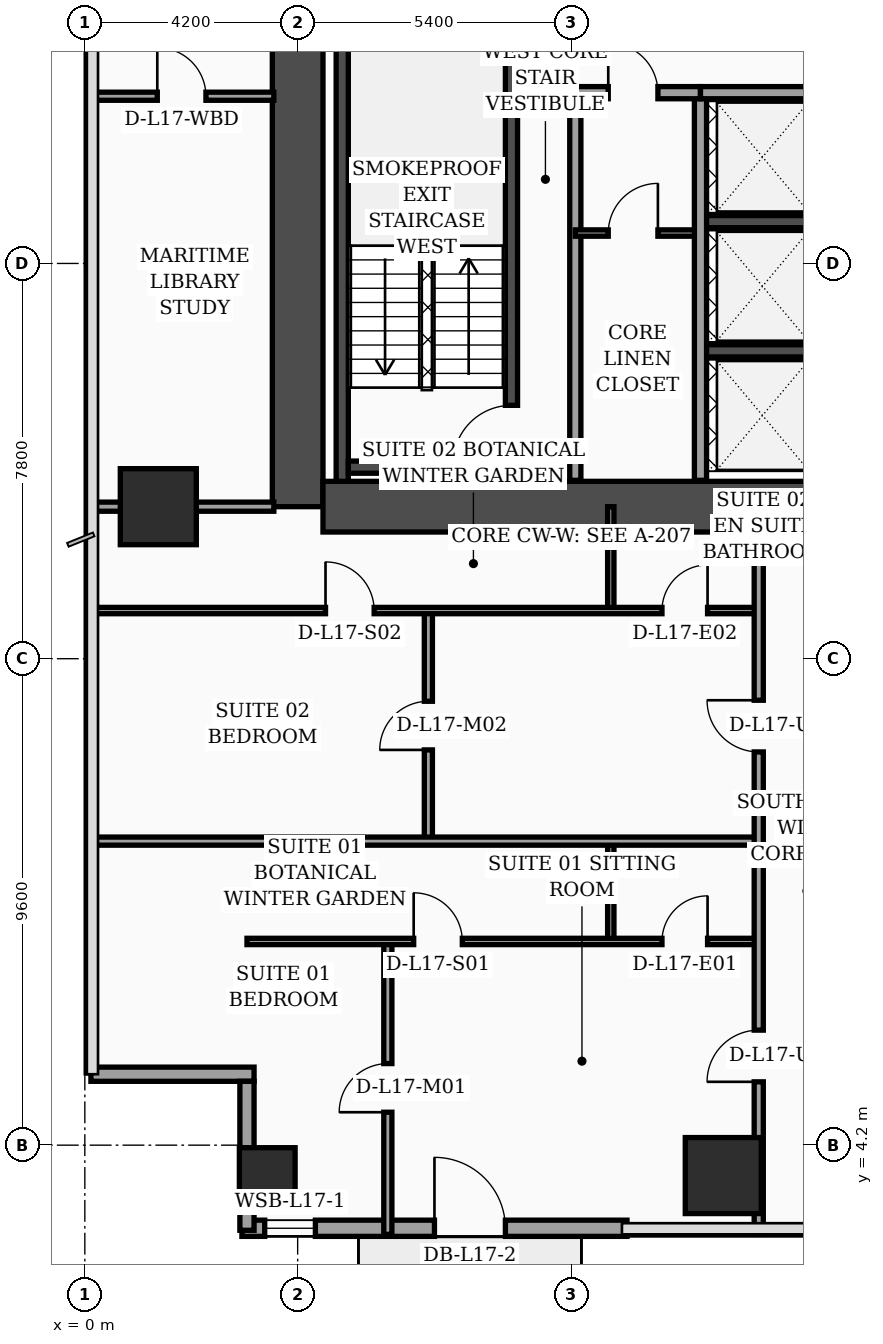
"""IFC4 building model, lengths in metres.
Left out: names, types, materials, properties, quantities, classifications, styles, units other than length and angle.
Written with IfcOpenShell. Run it as: python <this file> out.ifc"""

import sys

from ifc_helpers import new_model, si_unit, direction, frame, frame_2d, origin, origin_2d, place, context, subcontext, project, spatial, rectangle, hollow_rectangle, extrude, element, fill, save


model = new_model("IFC4")
c1 = context("Model", 3, precision=1e-05, world=origin(), true_north=direction((0.0, 1.0)))
c2 = subcontext(c1, "Body", "Model", "MODEL_VIEW")
j1 = project(units=[si_unit("LENGTHUNIT", "METRE"), si_unit("PLANEANGLEUNIT", "RADIAN")], contexts=[c1])
p1 = place(None, origin())
s1 = spatial("IfcSite", under=j1, at=p1, CompositionType="ELEMENT")
p2 = place(p1, origin())
s2 = spatial("IfcBuilding", under=s1, at=p2, CompositionType="ELEMENT")
p3 = place(p2, frame((0.0, 0.0, 73.6)))
s3 = spatial("IfcBuildingStorey", under=s2, at=p3, CompositionType="ELEMENT", Elevation=73.6)
p4 = place(p3, frame((4.2, 16.8, 0.0), z_axis=(0.0, 0.0, 1.0), x_axis=(0.0, 1.0, 0.0)))
e1 = element("IfcWall", 1, at=p4, inside=s3, PredefinedType="SHEAR", context=c2, shape_type="SweptSolid", body=[
    extrude(rectangle(XDim=21.6, YDim=1.0, at=frame_2d((10.8, 0.0))), origin(), (0.0, 0.0, 1.0), 3.56),
])
p5 = place(p3, frame((4.7, 16.8, 0.0), z_axis=(0.0, 0.0, 1.0), x_axis=(1.0, 0.0, 0.0)))
e2 = element("IfcWall", 2, at=p5, inside=s3, PredefinedType="SHEAR", context=c2, shape_type="SweptSolid", body=[
    extrude(rectangle(XDim=9.8, YDim=1.0, at=frame_2d((4.9, 0.0))), origin(), (0.0, 0.0, 1.0), 3.56),
])
p6 = place(p3, frame((5.08, 17.3, 0.0), z_axis=(0.0, 0.0, 1.0), x_axis=(0.0, 1.0, 0.0)))
e3 = element("IfcWall", 3, at=p6, inside=s3, PredefinedType="SOLIDWALL", context=c2, shape_type="SweptSolid", body=[
    extrude(rectangle(XDim=9.49, YDim=0.24, at=frame_2d((4.745, 0.0))), origin(), (0.0, 0.0, 1.0), 3.56),
])
p7 = place(p3, frame((8.42, 17.3, 0.0), z_axis=(0.0, 0.0, 1.0), x_axis=(0.0, 1.0, 0.0)))
e4 = element("IfcWall", 4, at=p7, inside=s3, PredefinedType="SOLIDWALL", context=c2, shape_type="SweptSolid", body=[
    extrude(rectangle(XDim=9.49, YDim=0.24, at=frame_2d((4.745, 0.0))), origin(), (0.0, 0.0, 1.0), 3.56),
])
p8 = place(p7, frame((0.35, 0.0, 0.0)))
e5 = element("IfcOpeningElement", 5, at=p8, cuts=e4, PredefinedType="OPENING", context=c2, shape_type="SweptSolid", body=[
    extrude(rectangle(XDim=1.15, YDim=2.2, at=frame_2d((0.575, 1.1))), frame((0.0, 0.13, 0.0), z_axis=(0.0, -1.0, 0.0), x_axis=(1.0, 0.0, 0.0)), (0.0, 0.0, 1.0), 0.26),
])
p9 = place(p3, frame((5.2, 17.58, 0.0), z_axis=(0.0, 0.0, 1.0), x_axis=(1.0, 0.0, 0.0)))
e6 = element("IfcWall", 6, at=p9, inside=s3, PredefinedType="SOLIDWALL", context=c2, shape_type="SweptSolid", body=[
    extrude(rectangle(XDim=3.1, YDim=0.24, at=frame_2d((1.55, 0.0))), origin(), (0.0, 0.0, 1.0), 3.56),
])
for number, where, z_axis, x_axis in (
    (7, (12.18, 19.875, 0.0), (0.0, 0.0, 1.0), (1.0, 0.0, 0.0)),
    (8, (12.18, 22.425, 0.0), (0.0, 0.0, 1.0), (1.0, 0.0, 0.0)),
):
    element("IfcWall", number, at=place(p3, frame(where, z_axis=z_axis, x_axis=x_axis)), inside=s3, PredefinedType="SOLIDWALL", context=c2, shape_type="SweptSolid", body=[
        extrude(rectangle(XDim=2.32, YDim=0.24, at=frame_2d((1.16, 0.0))), origin(), (0.0, 0.0, 1.0), 3.56),
    ])
p10 = place(p3, frame((3.6, 3.6, 0.0), z_axis=(0.0, 0.0, 1.0), x_axis=(1.0, 0.0, 0.0)))
e9 = element("IfcColumn", 9, at=p10, inside=s3, PredefinedType="COLUMN", context=c2, shape_type="SweptSolid", body=[
    extrude(hollow_rectangle(XDim=1.1, YDim=1.1, WallThickness=0.045, at=origin_2d()), origin(), (0.0, 0.0, 1.0), 3.56),
])
for number, where, z_axis, x_axis in (
    (10, (1.45, 16.8, 0.0), (0.0, 0.0, 1.0), (1.0, 0.0, 0.0)),
    (11, (12.6, 3.6, 0.0), (0.0, 0.0, 1.0), (1.0, 0.0, 0.0)),
):
    element("IfcColumn", number, at=place(p3, frame(where, z_axis=z_axis, x_axis=x_axis)), inside=s3, PredefinedType="COLUMN", context=c2, shape_type="SweptSolid", body=[
        extrude(rectangle(XDim=1.5, YDim=1.5, at=origin_2d()), origin(), (0.0, 0.0, 1.0), 3.56),
    ])
p11 = place(p3, frame((3.1, 2.56, 0.0), z_axis=(0.0, 0.0, 1.0), x_axis=(1.0, 0.0, 0.0)))
e12 = element("IfcWall", 12, at=p11, inside=s3, PredefinedType="SOLIDWALL", context=c2, shape_type="SweptSolid", body=[
    extrude(rectangle(XDim=7.6, YDim=0.32, at=frame_2d((3.8, 0.0))), origin(), (0.0, 0.0, 1.0), 3.56),
])
p12 = place(p11, frame((0.45, 0.0, 0.75)))
e13 = element("IfcOpeningElement", 13, at=p12, cuts=e12, PredefinedType="OPENING", context=c2, shape_type="SweptSolid", body=[
    extrude(rectangle(XDim=1.0, YDim=1.6, at=frame_2d((0.5, 0.8))), frame((0.0, 0.17, 0.0), z_axis=(0.0, -1.0, 0.0), x_axis=(1.0, 0.0, 0.0)), (0.0, 0.0, 1.0), 0.34),
])
p13 = place(p11, frame((3.8, 0.0, 0.0)))
e14 = element("IfcOpeningElement", 14, at=p13, cuts=e12, PredefinedType="OPENING", context=c2, shape_type="SweptSolid", body=[
    extrude(rectangle(XDim=1.4, YDim=2.25, at=frame_2d((0.7, 1.125))), frame((0.0, 0.17, 0.0), z_axis=(0.0, -1.0, 0.0), x_axis=(1.0, 0.0, 0.0)), (0.0, 0.0, 1.0), 0.34),
])
p14 = place(p3, frame((0.12, 5.6, 0.0), z_axis=(0.0, 0.0, 1.0), x_axis=(1.0, 0.0, 0.0)))
e15 = element("IfcWall", 15, at=p14, inside=s3, PredefinedType="SOLIDWALL", context=c2, shape_type="SweptSolid", body=[
    extrude(rectangle(XDim=3.22, YDim=0.28, at=frame_2d((1.61, 0.0))), origin(), (0.0, 0.0, 1.0), 2.84),
])
p15 = place(p3, frame((3.2, 5.46, 0.0), z_axis=(0.0, 0.0, 1.0), x_axis=(0.0, -1.0, 0.0)))
e16 = element("IfcWall", 16, at=p15, inside=s3, PredefinedType="SOLIDWALL", context=c2, shape_type="SweptSolid", body=[
    extrude(rectangle(XDim=2.94, YDim=0.28, at=frame_2d((1.47, 0.0))), origin(), (0.0, 0.0, 1.0), 2.84),
])
p16 = place(p3, frame((9.68, 17.32, 0.0), z_axis=(0.0, 0.0, 1.0), x_axis=(0.0, 1.0, 0.0)))
e17 = element("IfcWall", 17, at=p16, inside=s3, PredefinedType="SOLIDWALL", context=c2, shape_type="SweptSolid", body=[
    extrude(rectangle(XDim=7.68, YDim=0.22, at=frame_2d((3.84, 0.0))), origin(), (0.0, 0.0, 1.0), 3.56),
])
p17 = place(p3, frame((9.68, 22.2, 0.0), z_axis=(0.0, 0.0, 1.0), x_axis=(1.0, 0.0, 0.0)))
e18 = element("IfcWall", 18, at=p17, inside=s3, PredefinedType="PARTITIONING", context=c2, shape_type="SweptSolid", body=[
    extrude(rectangle(XDim=2.47, YDim=0.125, at=frame_2d((1.235, 0.0))), origin(), (0.0, 0.0, 1.0), 3.56),
])
p18 = place(p17, frame((0.65, 0.0, 0.0)))
e19 = element("IfcOpeningElement", 19, at=p18, cuts=e18, PredefinedType="OPENING", context=c2, shape_type="SweptSolid", body=[
    extrude(rectangle(XDim=0.98, YDim=2.15, at=frame_2d((0.49, 1.075))), frame((0.0, 0.073, 0.0), z_axis=(0.0, -1.0, 0.0), x_axis=(1.0, 0.0, 0.0)), (0.0, 0.0, 1.0), 0.145),
])
p19 = place(p3, frame((12.15, 17.32, 0.0), z_axis=(0.0, 0.0, 1.0), x_axis=(0.0, 1.0, 0.0)))
e20 = element("IfcWall", 20, at=p19, inside=s3, PredefinedType="SOLIDWALL", context=c2, shape_type="SweptSolid", body=[
    extrude(rectangle(XDim=7.65, YDim=0.24, at=frame_2d((3.825, 0.0))), origin(), (0.0, 0.0, 1.0), 3.56),
])
p20 = place(p3, frame((9.68, 24.97, 0.0), z_axis=(0.0, 0.0, 1.0), x_axis=(1.0, 0.0, 0.0)))
e21 = element("IfcWall", 21, at=p20, inside=s3, PredefinedType="SOLIDWALL", context=c2, shape_type="SweptSolid", body=[
    extrude(rectangle(XDim=2.47, YDim=0.24, at=frame_2d((1.235, 0.0))), origin(), (0.0, 0.0, 1.0), 3.56),
])
p21 = place(p20, frame((0.65, 0.0, 0.0)))
e22 = element("IfcOpeningElement", 22, at=p21, cuts=e21, PredefinedType="OPENING", context=c2, shape_type="SweptSolid", body=[
    extrude(rectangle(XDim=0.98, YDim=2.15, at=frame_2d((0.49, 1.075))), frame((0.0, 0.13, 0.0), z_axis=(0.0, -1.0, 0.0), x_axis=(1.0, 0.0, 0.0)), (0.0, 0.0, 1.0), 0.26),
])
p22 = place(p3, frame((12.15, 24.97, 0.0), z_axis=(0.0, 0.0, 1.0), x_axis=(1.0, 0.0, 0.0)))
e23 = element("IfcWall", 23, at=p22, inside=s3, PredefinedType="SOLIDWALL", context=c2, shape_type="SweptSolid", body=[
    extrude(rectangle(XDim=2.33, YDim=0.24, at=frame_2d((1.165, 0.0))), origin(), (0.0, 0.0, 1.0), 2.84),
])
p23 = place(p3, frame((0.08, 24.9, 0.0), z_axis=(0.0, 0.0, 1.0), x_axis=(1.0, 0.0, 0.0)))
e24 = element("IfcWall", 24, at=p23, inside=s3, PredefinedType="PARTITIONING", context=c2, shape_type="SweptSolid", body=[
    extrude(rectangle(XDim=3.65, YDim=0.16, at=frame_2d((1.825, 0.0))), origin(), (0.0, 0.0, 1.0), 3.04),
])
p24 = place(p23, frame((1.35, 0.0, 0.0)))
e25 = element("IfcOpeningElement", 25, at=p24, cuts=e24, PredefinedType="OPENING", context=c2, shape_type="SweptSolid", body=[
    extrude(rectangle(XDim=0.96, YDim=2.2, at=frame_2d((0.48, 1.1))), frame((0.0, 0.09, 0.0), z_axis=(0.0, -1.0, 0.0), x_axis=(1.0, 0.0, 0.0)), (0.0, 0.0, 1.0), 0.18),
])
p25 = place(p3, frame((0.08, 16.8, 0.0), z_axis=(0.0, 0.0, 1.0), x_axis=(1.0, 0.0, 0.0)))
e26 = element("IfcWall", 26, at=p25, inside=s3, PredefinedType="PARTITIONING", context=c2, shape_type="SweptSolid", body=[
    extrude(rectangle(XDim=3.65, YDim=0.18, at=frame_2d((1.825, 0.0))), origin(), (0.0, 0.0, 1.0), 2.84),
])
p26 = place(p3, frame((10.38, 8.22, 0.0), z_axis=(0.0, 0.0, 1.0), x_axis=(0.0, 1.0, 0.0)))
e27 = element("IfcWall", 27, at=p26, inside=s3, PredefinedType="PARTITIONING", context=c2, shape_type="SweptSolid", body=[
    extrude(rectangle(XDim=1.98, YDim=0.125, at=frame_2d((0.99, 0.0))), origin(), (0.0, 0.0, 1.0), 3.14),
])
p27 = place(p3, frame((5.98, 2.44, 0.0), z_axis=(0.0, 0.0, 1.0), x_axis=(0.0, 1.0, 0.0)))
e28 = element("IfcWall", 28, at=p27, inside=s3, PredefinedType="PARTITIONING", context=c2, shape_type="SweptSolid", body=[
    extrude(rectangle(XDim=5.78, YDim=0.16, at=frame_2d((2.89, 0.0))), origin(), (0.0, 0.0, 1.0), 3.04),
])
p28 = place(p27, frame((2.41, 0.0, 0.0)))
e29 = element("IfcOpeningElement", 29, at=p28, cuts=e28, PredefinedType="OPENING", context=c2, shape_type="SweptSolid", body=[
    extrude(rectangle(XDim=0.96, YDim=2.2, at=frame_2d((0.48, 1.1))), frame((0.0, 0.09, 0.0), z_axis=(0.0, -1.0, 0.0), x_axis=(1.0, 0.0, 0.0)), (0.0, 0.0, 1.0), 0.18),
])
p29 = place(p3, frame((3.2, 8.22, 0.0), z_axis=(0.0, 0.0, 1.0), x_axis=(1.0, 0.0, 0.0)))
e30 = element("IfcWall", 30, at=p29, inside=s3, PredefinedType="PARTITIONING", context=c2, shape_type="SweptSolid", body=[
    extrude(rectangle(XDim=10.1, YDim=0.125, at=frame_2d((5.05, 0.0))), origin(), (0.0, 0.0, 1.0), 2.84),
])
p30 = place(p29, frame((3.29, 0.0, 0.0)))
e31 = element("IfcOpeningElement", 31, at=p30, cuts=e30, PredefinedType="OPENING", context=c2, shape_type="SweptSolid", body=[
    extrude(rectangle(XDim=0.96, YDim=2.2, at=frame_2d((0.48, 1.1))), frame((0.0, 0.073, 0.0), z_axis=(0.0, -1.0, 0.0), x_axis=(1.0, 0.0, 0.0)), (0.0, 0.0, 1.0), 0.145),
])
p31 = place(p29, frame((8.19, 0.0, 0.0)))
e32 = element("IfcOpeningElement", 32, at=p31, cuts=e30, PredefinedType="OPENING", context=c2, shape_type="SweptSolid", body=[
    extrude(rectangle(XDim=0.9, YDim=2.15, at=frame_2d((0.45, 1.075))), frame((0.0, 0.073, 0.0), z_axis=(0.0, -1.0, 0.0), x_axis=(1.0, 0.0, 0.0)), (0.0, 0.0, 1.0), 0.145),
])
p32 = place(p3, frame((10.38, 14.75, 0.0), z_axis=(0.0, 0.0, 1.0), x_axis=(0.0, 1.0, 0.0)))
e33 = element("IfcWall", 33, at=p32, inside=s3, PredefinedType="PARTITIONING", context=c2, shape_type="SweptSolid", body=[
    extrude(rectangle(XDim=2.05, YDim=0.125, at=frame_2d((1.025, 0.0))), origin(), (0.0, 0.0, 1.0), 3.56),
])
p33 = place(p3, frame((6.78, 10.2, 0.0), z_axis=(0.0, 0.0, 1.0), x_axis=(0.0, 1.0, 0.0)))
e34 = element("IfcWall", 34, at=p33, inside=s3, PredefinedType="PARTITIONING", context=c2, shape_type="SweptSolid", body=[
    extrude(rectangle(XDim=4.55, YDim=0.16, at=frame_2d((2.275, 0.0))), origin(), (0.0, 0.0, 1.0), 3.14),
])
p34 = place(p33, frame((1.8, 0.0, 0.0)))
e35 = element("IfcOpeningElement", 35, at=p34, cuts=e34, PredefinedType="OPENING", context=c2, shape_type="SweptSolid", body=[
    extrude(rectangle(XDim=0.96, YDim=2.2, at=frame_2d((0.48, 1.1))), frame((0.0, 0.09, 0.0), z_axis=(0.0, -1.0, 0.0), x_axis=(1.0, 0.0, 0.0)), (0.0, 0.0, 1.0), 0.18),
])
p35 = place(p3, frame((0.08, 14.75, 0.0), z_axis=(0.0, 0.0, 1.0), x_axis=(1.0, 0.0, 0.0)))
e36 = element("IfcWall", 36, at=p35, inside=s3, PredefinedType="PARTITIONING", context=c2, shape_type="SweptSolid", body=[
    extrude(rectangle(XDim=13.22, YDim=0.125, at=frame_2d((6.61, 0.0))), origin(), (0.0, 0.0, 1.0), 2.84),
])
p36 = place(p35, frame((4.67, 0.0, 0.0)))
e37 = element("IfcOpeningElement", 37, at=p36, cuts=e36, PredefinedType="OPENING", context=c2, shape_type="SweptSolid", body=[
    extrude(rectangle(XDim=0.96, YDim=2.2, at=frame_2d((0.48, 1.1))), frame((0.0, 0.073, 0.0), z_axis=(0.0, -1.0, 0.0), x_axis=(1.0, 0.0, 0.0)), (0.0, 0.0, 1.0), 0.145),
])
p37 = place(p35, frame((11.31, 0.0, 0.0)))
e38 = element("IfcOpeningElement", 38, at=p37, cuts=e36, PredefinedType="OPENING", context=c2, shape_type="SweptSolid", body=[
    extrude(rectangle(XDim=0.9, YDim=2.15, at=frame_2d((0.45, 1.075))), frame((0.0, 0.073, 0.0), z_axis=(0.0, -1.0, 0.0), x_axis=(1.0, 0.0, 0.0)), (0.0, 0.0, 1.0), 0.145),
])
p38 = place(p3, frame((0.08, 10.2, 0.0), z_axis=(0.0, 0.0, 1.0), x_axis=(1.0, 0.0, 0.0)))
e39 = element("IfcWall", 39, at=p38, inside=s3, PredefinedType="PARTITIONING", context=c2, shape_type="SweptSolid", body=[
    extrude(rectangle(XDim=13.22, YDim=0.16, at=frame_2d((6.61, 0.0))), origin(), (0.0, 0.0, 1.0), 2.84),
])
p39 = place(p3, frame((13.3, 2.44, 0.0), z_axis=(0.0, 0.0, 1.0), x_axis=(0.0, 1.0, 0.0)))
e40 = element("IfcWall", 40, at=p39, inside=s3, PredefinedType="PARTITIONING", context=c2, shape_type="SweptSolid", body=[
    extrude(rectangle(XDim=14.36, YDim=0.18, at=frame_2d((7.18, 0.0))), origin(), (0.0, 0.0, 1.0), 3.04),
])
p40 = place(p39, frame((3.01, 0.0, 0.0)))
e41 = element("IfcOpeningElement", 41, at=p40, cuts=e40, PredefinedType="OPENING", context=c2, shape_type="SweptSolid", body=[
    extrude(rectangle(XDim=1.02, YDim=2.2, at=frame_2d((0.51, 1.1))), frame((0.0, 0.1, 0.0), z_axis=(0.0, -1.0, 0.0), x_axis=(1.0, 0.0, 0.0)), (0.0, 0.0, 1.0), 0.2),
])
p41 = place(p39, frame((9.52, 0.0, 0.0)))
e42 = element("IfcOpeningElement", 42, at=p41, cuts=e40, PredefinedType="OPENING", context=c2, shape_type="SweptSolid", body=[
    extrude(rectangle(XDim=1.02, YDim=2.2, at=frame_2d((0.51, 1.1))), frame((0.0, 0.1, 0.0), z_axis=(0.0, -1.0, 0.0), x_axis=(1.0, 0.0, 0.0)), (0.0, 0.0, 1.0), 0.2),
])
p42 = place(p12, origin())
e43 = element("IfcWindow", 43, at=p42, inside=s3, PartitioningType="SINGLE_PANEL", PredefinedType="WINDOW", context=c2, shape_type="SweptSolid", body=[
    extrude(rectangle(XDim=1.0, YDim=1.6, at=frame_2d((0.5, 0.8))), frame((0.0, 0.03, 0.0), z_axis=(0.0, -1.0, 0.0), x_axis=(1.0, 0.0, 0.0)), (0.0, 0.0, 1.0), 0.06),
])
fill(e13, e43)
p43 = place(p13, origin())
e44 = element("IfcDoor", 44, at=p43, inside=s3, OperationType="SINGLE_SWING_LEFT", PredefinedType="DOOR", context=c2, shape_type="SweptSolid", body=[
    extrude(rectangle(XDim=1.4, YDim=2.25, at=frame_2d((0.7, 1.125))), frame((0.0, 0.025, 0.0), z_axis=(0.0, -1.0, 0.0), x_axis=(1.0, 0.0, 0.0)), (0.0, 0.0, 1.0), 0.05),
])
fill(e14, e44)
p44 = place(p18, origin())
e45 = element("IfcDoor", 45, at=p44, inside=s3, OperationType="SINGLE_SWING_RIGHT", PredefinedType="DOOR", context=c2, shape_type="SweptSolid", body=[
    extrude(rectangle(XDim=0.98, YDim=2.15, at=frame_2d((0.49, 1.075))), frame((0.0, 0.025, 0.0), z_axis=(0.0, -1.0, 0.0), x_axis=(1.0, 0.0, 0.0)), (0.0, 0.0, 1.0), 0.05),
])
fill(e19, e45)
p45 = place(p21, origin())
e46 = element("IfcDoor", 46, at=p45, inside=s3, OperationType="SINGLE_SWING_LEFT", PredefinedType="DOOR", context=c2, shape_type="SweptSolid", body=[
    extrude(rectangle(XDim=0.98, YDim=2.15, at=frame_2d((0.49, 1.075))), frame((0.0, 0.025, 0.0), z_axis=(0.0, -1.0, 0.0), x_axis=(1.0, 0.0, 0.0)), (0.0, 0.0, 1.0), 0.05),
])
fill(e22, e46)
p46 = place(p24, origin())
e47 = element("IfcDoor", 47, at=p46, inside=s3, OperationType="SINGLE_SWING_LEFT", PredefinedType="DOOR", context=c2, shape_type="SweptSolid", body=[
    extrude(rectangle(XDim=0.96, YDim=2.2, at=frame_2d((0.48, 1.1))), frame((0.0, 0.025, 0.0), z_axis=(0.0, -1.0, 0.0), x_axis=(1.0, 0.0, 0.0)), (0.0, 0.0, 1.0), 0.05),
])
fill(e25, e47)
p47 = place(p28, origin())
e48 = element("IfcDoor", 48, at=p47, inside=s3, OperationType="SINGLE_SWING_LEFT", PredefinedType="DOOR", context=c2, shape_type="SweptSolid", body=[
    extrude(rectangle(XDim=0.96, YDim=2.2, at=frame_2d((0.48, 1.1))), frame((0.0, 0.025, 0.0), z_axis=(0.0, -1.0, 0.0), x_axis=(1.0, 0.0, 0.0)), (0.0, 0.0, 1.0), 0.05),
])
fill(e29, e48)
p48 = place(p30, origin())
e49 = element("IfcDoor", 49, at=p48, inside=s3, OperationType="SINGLE_SWING_LEFT", PredefinedType="DOOR", context=c2, shape_type="SweptSolid", body=[
    extrude(rectangle(XDim=0.96, YDim=2.2, at=frame_2d((0.48, 1.1))), frame((0.0, 0.025, 0.0), z_axis=(0.0, -1.0, 0.0), x_axis=(1.0, 0.0, 0.0)), (0.0, 0.0, 1.0), 0.05),
])
fill(e31, e49)
p49 = place(p31, origin())
e50 = element("IfcDoor", 50, at=p49, inside=s3, OperationType="SINGLE_SWING_RIGHT", PredefinedType="DOOR", context=c2, shape_type="SweptSolid", body=[
    extrude(rectangle(XDim=0.9, YDim=2.15, at=frame_2d((0.45, 1.075))), frame((0.0, 0.025, 0.0), z_axis=(0.0, -1.0, 0.0), x_axis=(1.0, 0.0, 0.0)), (0.0, 0.0, 1.0), 0.05),
])
fill(e32, e50)
p50 = place(p34, origin())
e51 = element("IfcDoor", 51, at=p50, inside=s3, OperationType="SINGLE_SWING_LEFT", PredefinedType="DOOR", context=c2, shape_type="SweptSolid", body=[
    extrude(rectangle(XDim=0.96, YDim=2.2, at=frame_2d((0.48, 1.1))), frame((0.0, 0.025, 0.0), z_axis=(0.0, -1.0, 0.0), x_axis=(1.0, 0.0, 0.0)), (0.0, 0.0, 1.0), 0.05),
])
fill(e35, e51)
p51 = place(p36, origin())
e52 = element("IfcDoor", 52, at=p51, inside=s3, OperationType="SINGLE_SWING_LEFT", PredefinedType="DOOR", context=c2, shape_type="SweptSolid", body=[
    extrude(rectangle(XDim=0.96, YDim=2.2, at=frame_2d((0.48, 1.1))), frame((0.0, 0.025, 0.0), z_axis=(0.0, -1.0, 0.0), x_axis=(1.0, 0.0, 0.0)), (0.0, 0.0, 1.0), 0.05),
])
fill(e37, e52)
p52 = place(p37, origin())
e53 = element("IfcDoor", 53, at=p52, inside=s3, OperationType="SINGLE_SWING_RIGHT", PredefinedType="DOOR", context=c2, shape_type="SweptSolid", body=[
    extrude(rectangle(XDim=0.9, YDim=2.15, at=frame_2d((0.45, 1.075))), frame((0.0, 0.025, 0.0), z_axis=(0.0, -1.0, 0.0), x_axis=(1.0, 0.0, 0.0)), (0.0, 0.0, 1.0), 0.05),
])
fill(e38, e53)
p53 = place(p40, origin())
e54 = element("IfcDoor", 54, at=p53, inside=s3, OperationType="SINGLE_SWING_LEFT", PredefinedType="DOOR", context=c2, shape_type="SweptSolid", body=[
    extrude(rectangle(XDim=1.02, YDim=2.2, at=frame_2d((0.51, 1.1))), frame((0.0, 0.025, 0.0), z_axis=(0.0, -1.0, 0.0), x_axis=(1.0, 0.0, 0.0)), (0.0, 0.0, 1.0), 0.05),
])
fill(e41, e54)
p54 = place(p41, origin())
e55 = element("IfcDoor", 55, at=p54, inside=s3, OperationType="SINGLE_SWING_RIGHT", PredefinedType="DOOR", context=c2, shape_type="SweptSolid", body=[
    extrude(rectangle(XDim=1.02, YDim=2.2, at=frame_2d((0.51, 1.1))), frame((0.0, 0.025, 0.0), z_axis=(0.0, -1.0, 0.0), x_axis=(1.0, 0.0, 0.0)), (0.0, 0.0, 1.0), 0.05),
])
fill(e42, e55)
p55 = place(p8, origin())
e56 = element("IfcDoor", 56, at=p55, inside=s3, OperationType="SINGLE_SWING_LEFT", PredefinedType="DOOR", context=c2, shape_type="SweptSolid", body=[
    extrude(rectangle(XDim=1.15, YDim=2.2, at=frame_2d((0.575, 1.1))), frame((0.0, 0.025, 0.0), z_axis=(0.0, -1.0, 0.0), x_axis=(1.0, 0.0, 0.0)), (0.0, 0.0, 1.0), 0.05),
])
fill(e5, e56)
save(model, sys.argv[1])
